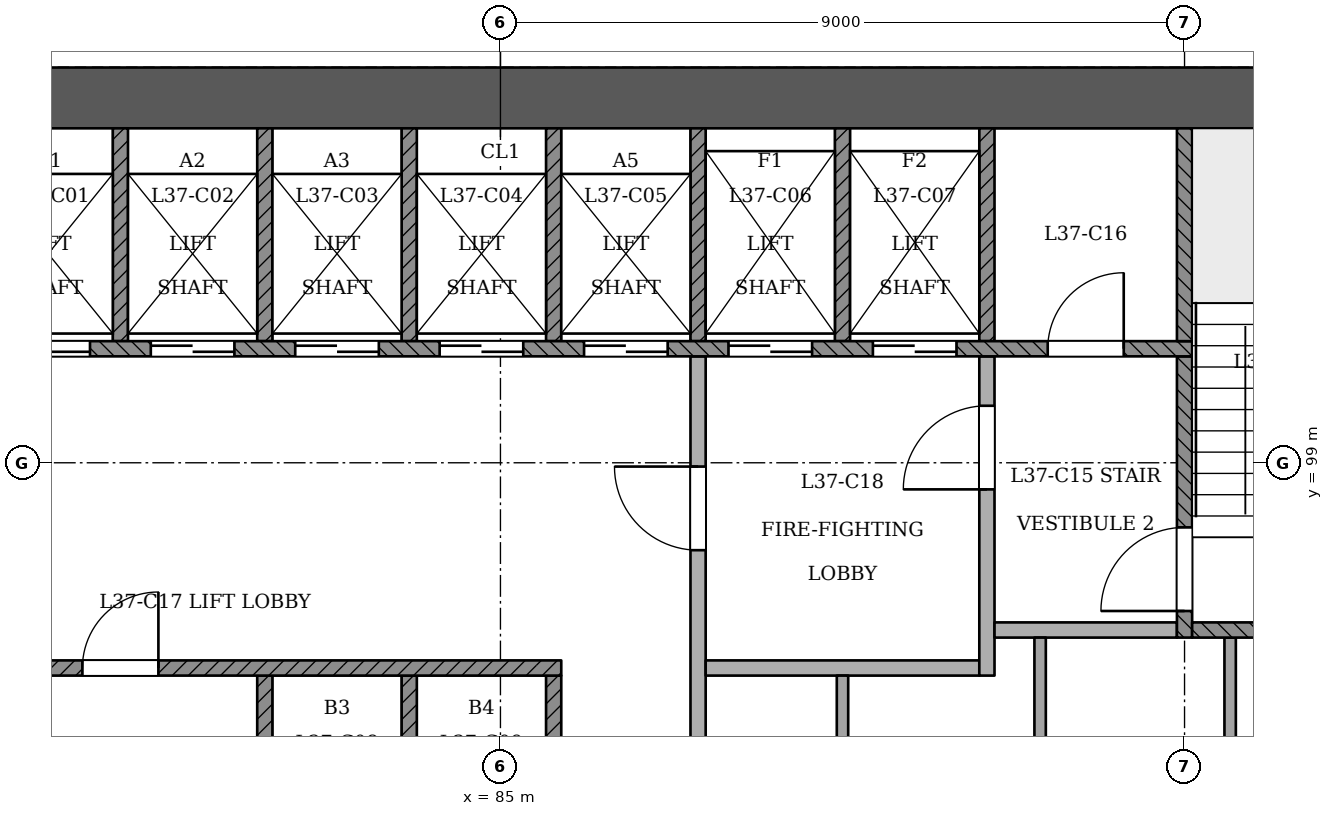
"""IFC4 building model, lengths in metres.
Left out: names, types, materials, properties, quantities, classifications, styles, units other than length and angle.
Written with IfcOpenShell. Run it as: python <this file> out.ifc"""

import sys

from ifc_helpers import new_model, si_unit, direction, frame, frame_2d, origin, place, context, subcontext, project, spatial, rectangle, extrude, element, fill, save


model = new_model("IFC4")
c1 = context("Model", 3, precision=1e-05, world=origin(), true_north=direction((0.0, 1.0)))
c2 = subcontext(c1, "Body", "Model", "MODEL_VIEW")
j1 = project(units=[si_unit("LENGTHUNIT", "METRE"), si_unit("PLANEANGLEUNIT", "RADIAN")], contexts=[c1])
p1 = place(None, origin())
s1 = spatial("IfcSite", under=j1, at=p1, CompositionType="ELEMENT")
p2 = place(p1, origin())
s2 = spatial("IfcBuilding", under=s1, at=p2, CompositionType="ELEMENT")
p3 = place(p2, frame((0.0, 0.0, 145.8)))
s3 = spatial("IfcBuildingStorey", under=s2, at=p3, CompositionType="ELEMENT", Elevation=145.8)
p4 = place(p3, frame((97.4, 103.8, 0.0), z_axis=(0.0, 0.0, 1.0), x_axis=(-1.0, 0.0, 0.0)))
e1 = element("IfcWall", 1, at=p4, inside=s3, PredefinedType="SHEAR", context=c2, shape_type="SweptSolid", body=[
    extrude(rectangle(XDim=25.2, YDim=0.8, at=frame_2d((12.6, 0.0))), origin(), (0.0, 0.0, 1.0), 3.6),
])
p5 = place(p3, frame((66.082, 96.91, 0.0), z_axis=(0.0, 0.0, 1.0), x_axis=(0.500001949747, -0.866024278094, 0.0)))
e2 = element("IfcWall", 2, at=p5, inside=s3, PredefinedType="PARTITIONING", context=c2, shape_type="SweptSolid", body=[
    extrude(rectangle(XDim=37.705, YDim=0.15, at=frame_2d((18.853, 0.0))), origin(), (0.0, 0.0, 1.0), 2.75),
])
p6 = place(p5, frame((1.75, 0.0, 0.0)))
e3 = element("IfcOpeningElement", 3, at=p6, cuts=e2, PredefinedType="OPENING", context=c2, shape_type="SweptSolid", body=[
    extrude(rectangle(XDim=1.0, YDim=2.1, at=frame_2d((0.5, 1.05))), frame((0.0, 0.085, 0.0), z_axis=(0.0, -1.0, 0.0), x_axis=(1.0, 0.0, 0.0)), (0.0, 0.0, 1.0), 0.171),
])
p7 = place(p5, frame((7.329, 0.0, 0.0)))
e4 = element("IfcOpeningElement", 4, at=p7, cuts=e2, PredefinedType="OPENING", context=c2, shape_type="SweptSolid", body=[
    extrude(rectangle(XDim=1.1, YDim=2.1, at=frame_2d((0.55, 1.05))), frame((0.0, 0.085, 0.0), z_axis=(0.0, -1.0, 0.0), x_axis=(1.0, 0.0, 0.0)), (0.0, 0.0, 1.0), 0.171),
])
p8 = place(p5, frame((9.72, 0.0, 0.0)))
e5 = element("IfcOpeningElement", 5, at=p8, cuts=e2, PredefinedType="OPENING", context=c2, shape_type="SweptSolid", body=[
    extrude(rectangle(XDim=1.0, YDim=2.1, at=frame_2d((0.5, 1.05))), frame((0.0, 0.085, 0.0), z_axis=(0.0, -1.0, 0.0), x_axis=(1.0, 0.0, 0.0)), (0.0, 0.0, 1.0), 0.171),
])
p9 = place(p5, frame((16.28, 0.0, 0.0)))
e6 = element("IfcOpeningElement", 6, at=p9, cuts=e2, PredefinedType="OPENING", context=c2, shape_type="SweptSolid", body=[
    extrude(rectangle(XDim=1.0, YDim=2.1, at=frame_2d((0.5, 1.05))), frame((0.0, 0.085, 0.0), z_axis=(0.0, -1.0, 0.0), x_axis=(1.0, 0.0, 0.0)), (0.0, 0.0, 1.0), 0.171),
])
p10 = place(p5, frame((18.72, 0.0, 0.0)))
e7 = element("IfcOpeningElement", 7, at=p10, cuts=e2, PredefinedType="OPENING", context=c2, shape_type="SweptSolid", body=[
    extrude(rectangle(XDim=1.0, YDim=2.1, at=frame_2d((0.5, 1.05))), frame((0.0, 0.085, 0.0), z_axis=(0.0, -1.0, 0.0), x_axis=(1.0, 0.0, 0.0)), (0.0, 0.0, 1.0), 0.171),
])
p11 = place(p5, frame((25.28, 0.0, 0.0)))
e8 = element("IfcOpeningElement", 8, at=p11, cuts=e2, PredefinedType="OPENING", context=c2, shape_type="SweptSolid", body=[
    extrude(rectangle(XDim=1.0, YDim=2.1, at=frame_2d((0.5, 1.05))), frame((0.0, 0.085, 0.0), z_axis=(0.0, -1.0, 0.0), x_axis=(1.0, 0.0, 0.0)), (0.0, 0.0, 1.0), 0.171),
])
p12 = place(p5, frame((27.72, 0.0, 0.0)))
e9 = element("IfcOpeningElement", 9, at=p12, cuts=e2, PredefinedType="OPENING", context=c2, shape_type="SweptSolid", body=[
    extrude(rectangle(XDim=1.0, YDim=2.1, at=frame_2d((0.5, 1.05))), frame((0.0, 0.085, 0.0), z_axis=(0.0, -1.0, 0.0), x_axis=(1.0, 0.0, 0.0)), (0.0, 0.0, 1.0), 0.171),
])
p13 = place(p5, frame((34.329, 0.0, 0.0)))
e10 = element("IfcOpeningElement", 10, at=p13, cuts=e2, PredefinedType="OPENING", context=c2, shape_type="SweptSolid", body=[
    extrude(rectangle(XDim=1.1, YDim=2.1, at=frame_2d((0.55, 1.05))), frame((0.0, 0.085, 0.0), z_axis=(0.0, -1.0, 0.0), x_axis=(1.0, 0.0, 0.0)), (0.0, 0.0, 1.0), 0.171),
])
p14 = place(p3, frame((85.0, 64.144, 0.0), z_axis=(0.0, 0.0, 1.0), x_axis=(0.50000053273, 0.866025096212, 0.0)))
e11 = element("IfcWall", 11, at=p14, inside=s3, PredefinedType="PARTITIONING", context=c2, shape_type="SweptSolid", body=[
    extrude(rectangle(XDim=39.671, YDim=0.15, at=frame_2d((19.835, 0.0))), origin(), (0.0, 0.0, 1.0), 2.75),
])
p15 = place(p14, frame((0.618, 0.0, 0.0)))
e12 = element("IfcOpeningElement", 12, at=p15, cuts=e11, PredefinedType="OPENING", context=c2, shape_type="SweptSolid", body=[
    extrude(rectangle(XDim=1.2, YDim=2.1, at=frame_2d((0.6, 1.05))), frame((0.0, 0.085, 0.0), z_axis=(0.0, -1.0, 0.0), x_axis=(1.0, 0.0, 0.0)), (0.0, 0.0, 1.0), 0.171),
])
p16 = place(p14, frame((9.115, 0.0, 0.0)))
e13 = element("IfcOpeningElement", 13, at=p16, cuts=e11, PredefinedType="OPENING", context=c2, shape_type="SweptSolid", body=[
    extrude(rectangle(XDim=1.0, YDim=2.1, at=frame_2d((0.5, 1.05))), frame((0.0, 0.085, 0.0), z_axis=(0.0, -1.0, 0.0), x_axis=(1.0, 0.0, 0.0)), (0.0, 0.0, 1.0), 0.171),
])
p17 = place(p14, frame((11.556, 0.0, 0.0)))
e14 = element("IfcOpeningElement", 14, at=p17, cuts=e11, PredefinedType="OPENING", context=c2, shape_type="SweptSolid", body=[
    extrude(rectangle(XDim=1.0, YDim=2.1, at=frame_2d((0.5, 1.05))), frame((0.0, 0.085, 0.0), z_axis=(0.0, -1.0, 0.0), x_axis=(1.0, 0.0, 0.0)), (0.0, 0.0, 1.0), 0.171),
])
p18 = place(p14, frame((18.115, 0.0, 0.0)))
e15 = element("IfcOpeningElement", 15, at=p18, cuts=e11, PredefinedType="OPENING", context=c2, shape_type="SweptSolid", body=[
    extrude(rectangle(XDim=1.0, YDim=2.1, at=frame_2d((0.5, 1.05))), frame((0.0, 0.085, 0.0), z_axis=(0.0, -1.0, 0.0), x_axis=(1.0, 0.0, 0.0)), (0.0, 0.0, 1.0), 0.171),
])
p19 = place(p14, frame((20.556, 0.0, 0.0)))
e16 = element("IfcOpeningElement", 16, at=p19, cuts=e11, PredefinedType="OPENING", context=c2, shape_type="SweptSolid", body=[
    extrude(rectangle(XDim=1.0, YDim=2.1, at=frame_2d((0.5, 1.05))), frame((0.0, 0.085, 0.0), z_axis=(0.0, -1.0, 0.0), x_axis=(1.0, 0.0, 0.0)), (0.0, 0.0, 1.0), 0.171),
])
p20 = place(p14, frame((27.115, 0.0, 0.0)))
e17 = element("IfcOpeningElement", 17, at=p20, cuts=e11, PredefinedType="OPENING", context=c2, shape_type="SweptSolid", body=[
    extrude(rectangle(XDim=1.0, YDim=2.1, at=frame_2d((0.5, 1.05))), frame((0.0, 0.085, 0.0), z_axis=(0.0, -1.0, 0.0), x_axis=(1.0, 0.0, 0.0)), (0.0, 0.0, 1.0), 0.171),
])
p21 = place(p14, frame((30.585, 0.0, 0.0)))
e18 = element("IfcOpeningElement", 18, at=p21, cuts=e11, PredefinedType="OPENING", context=c2, shape_type="SweptSolid", body=[
    extrude(rectangle(XDim=1.0, YDim=2.1, at=frame_2d((0.5, 1.05))), frame((0.0, 0.085, 0.0), z_axis=(0.0, -1.0, 0.0), x_axis=(1.0, 0.0, 0.0)), (0.0, 0.0, 1.0), 0.171),
])
p22 = place(p14, frame((36.164, 0.0, 0.0)))
e19 = element("IfcOpeningElement", 19, at=p22, cuts=e11, PredefinedType="OPENING", context=c2, shape_type="SweptSolid", body=[
    extrude(rectangle(XDim=1.1, YDim=2.1, at=frame_2d((0.55, 1.05))), frame((0.0, 0.085, 0.0), z_axis=(0.0, -1.0, 0.0), x_axis=(1.0, 0.0, 0.0)), (0.0, 0.0, 1.0), 0.171),
])
p23 = place(p14, frame((38.271, 0.0, 0.0)))
e20 = element("IfcOpeningElement", 20, at=p23, cuts=e11, PredefinedType="OPENING", context=c2, shape_type="SweptSolid", body=[
    extrude(rectangle(XDim=1.2, YDim=2.1, at=frame_2d((0.6, 1.05))), frame((0.0, 0.085, 0.0), z_axis=(0.0, -1.0, 0.0), x_axis=(1.0, 0.0, 0.0)), (0.0, 0.0, 1.0), 0.171),
])
for number, where, z_axis, x_axis in (
    (21, (81.9, 93.4, 0.0), (0.0, 0.0, 1.0), (0.0, 1.0, 0.0)),
    (22, (83.8, 93.4, 0.0), (0.0, 0.0, 1.0), (0.0, 1.0, 0.0)),
    (23, (85.7, 93.4, 0.0), (0.0, 0.0, 1.0), (0.0, 1.0, 0.0)),
):
    element("IfcWall", number, at=place(p3, frame(where, z_axis=z_axis, x_axis=x_axis)), inside=s3, PredefinedType="SOLIDWALL", context=c2, shape_type="SweptSolid", body=[
        extrude(rectangle(XDim=2.8, YDim=0.2, at=frame_2d((1.4, 0.0))), origin(), (0.0, 0.0, 1.0), 3.15),
    ])
p24 = place(p3, frame((87.6, 93.4, 0.0), z_axis=(0.0, 0.0, 1.0), x_axis=(0.0, 1.0, 0.0)))
e24 = element("IfcWall", 24, at=p24, inside=s3, PredefinedType="PARTITIONING", context=c2, shape_type="SweptSolid", body=[
    extrude(rectangle(XDim=7.0, YDim=0.2, at=frame_2d((3.5, 0.0))), origin(), (0.0, 0.0, 1.0), 3.15),
])
p25 = place(p24, frame((4.45, 0.0, 0.0)))
e25 = element("IfcOpeningElement", 25, at=p25, cuts=e24, PredefinedType="OPENING", context=c2, shape_type="SweptSolid", body=[
    extrude(rectangle(XDim=1.1, YDim=2.1, at=frame_2d((0.55, 1.05))), frame((0.0, 0.11, 0.0), z_axis=(0.0, -1.0, 0.0), x_axis=(1.0, 0.0, 0.0)), (0.0, 0.0, 1.0), 0.221),
])
p26 = place(p3, frame((89.5, 93.4, 0.0), z_axis=(0.0, 0.0, 1.0), x_axis=(0.0, 1.0, 0.0)))
e26 = element("IfcWall", 26, at=p26, inside=s3, PredefinedType="PARTITIONING", context=c2, shape_type="SweptSolid", body=[
    extrude(rectangle(XDim=2.8, YDim=0.15, at=frame_2d((1.4, 0.0))), origin(), (0.0, 0.0, 1.0), 3.15),
])
for number, where, z_axis, x_axis in (
    (27, (92.1, 93.4, 0.0), (0.0, 0.0, 1.0), (0.0, 1.0, 0.0)),
    (28, (94.6, 93.4, 0.0), (0.0, 0.0, 1.0), (0.0, 1.0, 0.0)),
):
    element("IfcWall", number, at=place(p3, frame(where, z_axis=z_axis, x_axis=x_axis)), inside=s3, PredefinedType="PARTITIONING", context=c2, shape_type="SweptSolid", body=[
        extrude(rectangle(XDim=3.3, YDim=0.15, at=frame_2d((1.65, 0.0))), origin(), (0.0, 0.0, 1.0), 3.15),
    ])
p27 = place(p3, frame((78.0, 96.3, 0.0), z_axis=(0.0, 0.0, 1.0), x_axis=(1.0, 0.0, 0.0)))
e29 = element("IfcWall", 29, at=p27, inside=s3, PredefinedType="SOLIDWALL", context=c2, shape_type="SweptSolid", body=[
    extrude(rectangle(XDim=7.8, YDim=0.2, at=frame_2d((3.9, 0.0))), origin(), (0.0, 0.0, 1.0), 3.15),
])
p28 = place(p27, frame((1.5, 0.0, 0.0)))
e30 = element("IfcOpeningElement", 30, at=p28, cuts=e29, PredefinedType="OPENING", context=c2, shape_type="SweptSolid", body=[
    extrude(rectangle(XDim=1.0, YDim=2.1, at=frame_2d((0.5, 1.05))), frame((0.0, 0.11, 0.0), z_axis=(0.0, -1.0, 0.0), x_axis=(1.0, 0.0, 0.0)), (0.0, 0.0, 1.0), 0.221),
])
p29 = place(p3, frame((87.7, 96.3, 0.0), z_axis=(0.0, 0.0, 1.0), x_axis=(1.0, 0.0, 0.0)))
e31 = element("IfcWall", 31, at=p29, inside=s3, PredefinedType="PARTITIONING", context=c2, shape_type="SweptSolid", body=[
    extrude(rectangle(XDim=3.6, YDim=0.2, at=frame_2d((1.8, 0.0))), origin(), (0.0, 0.0, 1.0), 3.15),
])
p30 = place(p3, frame((91.4, 96.2, 0.0), z_axis=(0.0, 0.0, 1.0), x_axis=(0.0, 1.0, 0.0)))
e32 = element("IfcWall", 32, at=p30, inside=s3, PredefinedType="PARTITIONING", context=c2, shape_type="SweptSolid", body=[
    extrude(rectangle(XDim=4.2, YDim=0.2, at=frame_2d((2.1, 0.0))), origin(), (0.0, 0.0, 1.0), 3.15),
])
p31 = place(p30, frame((2.45, 0.0, 0.0)))
e33 = element("IfcOpeningElement", 33, at=p31, cuts=e32, PredefinedType="OPENING", context=c2, shape_type="SweptSolid", body=[
    extrude(rectangle(XDim=1.1, YDim=2.1, at=frame_2d((0.55, 1.05))), frame((0.0, 0.11, 0.0), z_axis=(0.0, -1.0, 0.0), x_axis=(1.0, 0.0, 0.0)), (0.0, 0.0, 1.0), 0.221),
])
p32 = place(p3, frame((91.5, 96.8, 0.0), z_axis=(0.0, 0.0, 1.0), x_axis=(1.0, 0.0, 0.0)))
e34 = element("IfcWall", 34, at=p32, inside=s3, PredefinedType="PARTITIONING", context=c2, shape_type="SweptSolid", body=[
    extrude(rectangle(XDim=2.4, YDim=0.2, at=frame_2d((1.2, 0.0))), origin(), (0.0, 0.0, 1.0), 3.15),
])
p33 = place(p3, frame((94.0, 96.7, 0.0), z_axis=(0.0, 0.0, 1.0), x_axis=(0.0, 1.0, 0.0)))
e35 = element("IfcWall", 35, at=p33, inside=s3, PredefinedType="SOLIDWALL", context=c2, shape_type="SweptSolid", body=[
    extrude(rectangle(XDim=3.7, YDim=0.2, at=frame_2d((1.85, 0.0))), origin(), (0.0, 0.0, 1.0), 3.15),
])
p34 = place(p33, frame((0.35, 0.0, 0.0)))
e36 = element("IfcOpeningElement", 36, at=p34, cuts=e35, PredefinedType="OPENING", context=c2, shape_type="SweptSolid", body=[
    extrude(rectangle(XDim=1.1, YDim=2.1, at=frame_2d((0.55, 1.05))), frame((0.0, 0.11, 0.0), z_axis=(0.0, -1.0, 0.0), x_axis=(1.0, 0.0, 0.0)), (0.0, 0.0, 1.0), 0.221),
])
p35 = place(p3, frame((94.1, 96.8, 0.0), z_axis=(0.0, 0.0, 1.0), x_axis=(1.0, 0.0, 0.0)))
e37 = element("IfcWall", 37, at=p35, inside=s3, PredefinedType="SOLIDWALL", context=c2, shape_type="SweptSolid", body=[
    extrude(rectangle(XDim=2.9, YDim=0.2, at=frame_2d((1.45, 0.0))), origin(), (0.0, 0.0, 1.0), 3.15),
])
p36 = place(p3, frame((75.9, 100.5, 0.0), z_axis=(0.0, 0.0, 1.0), x_axis=(1.0, 0.0, 0.0)))
e38 = element("IfcWall", 38, at=p36, inside=s3, PredefinedType="SOLIDWALL", context=c2, shape_type="SweptSolid", body=[
    extrude(rectangle(XDim=18.2, YDim=0.2, at=frame_2d((9.1, 0.0))), origin(), (0.0, 0.0, 1.0), 3.15),
])
p37 = place(p36, frame((2.6, 0.0, 0.0)))
e39 = element("IfcOpeningElement", 39, at=p37, cuts=e38, PredefinedType="OPENING", context=c2, shape_type="SweptSolid", body=[
    extrude(rectangle(XDim=1.1, YDim=2.1, at=frame_2d((0.55, 1.05))), frame((0.0, 0.11, 0.0), z_axis=(0.0, -1.0, 0.0), x_axis=(1.0, 0.0, 0.0)), (0.0, 0.0, 1.0), 0.221),
])
p38 = place(p36, frame((4.5, 0.0, 0.0)))
e40 = element("IfcOpeningElement", 40, at=p38, cuts=e38, PredefinedType="OPENING", context=c2, shape_type="SweptSolid", body=[
    extrude(rectangle(XDim=1.1, YDim=2.1, at=frame_2d((0.55, 1.05))), frame((0.0, 0.11, 0.0), z_axis=(0.0, -1.0, 0.0), x_axis=(1.0, 0.0, 0.0)), (0.0, 0.0, 1.0), 0.221),
])
p39 = place(p36, frame((6.4, 0.0, 0.0)))
e41 = element("IfcOpeningElement", 41, at=p39, cuts=e38, PredefinedType="OPENING", context=c2, shape_type="SweptSolid", body=[
    extrude(rectangle(XDim=1.1, YDim=2.1, at=frame_2d((0.55, 1.05))), frame((0.0, 0.11, 0.0), z_axis=(0.0, -1.0, 0.0), x_axis=(1.0, 0.0, 0.0)), (0.0, 0.0, 1.0), 0.221),
])
p40 = place(p36, frame((8.3, 0.0, 0.0)))
e42 = element("IfcOpeningElement", 42, at=p40, cuts=e38, PredefinedType="OPENING", context=c2, shape_type="SweptSolid", body=[
    extrude(rectangle(XDim=1.1, YDim=2.1, at=frame_2d((0.55, 1.05))), frame((0.0, 0.11, 0.0), z_axis=(0.0, -1.0, 0.0), x_axis=(1.0, 0.0, 0.0)), (0.0, 0.0, 1.0), 0.221),
])
p41 = place(p36, frame((10.2, 0.0, 0.0)))
e43 = element("IfcOpeningElement", 43, at=p41, cuts=e38, PredefinedType="OPENING", context=c2, shape_type="SweptSolid", body=[
    extrude(rectangle(XDim=1.1, YDim=2.1, at=frame_2d((0.55, 1.05))), frame((0.0, 0.11, 0.0), z_axis=(0.0, -1.0, 0.0), x_axis=(1.0, 0.0, 0.0)), (0.0, 0.0, 1.0), 0.221),
])
p42 = place(p36, frame((12.1, 0.0, 0.0)))
e44 = element("IfcOpeningElement", 44, at=p42, cuts=e38, PredefinedType="OPENING", context=c2, shape_type="SweptSolid", body=[
    extrude(rectangle(XDim=1.1, YDim=2.1, at=frame_2d((0.55, 1.05))), frame((0.0, 0.11, 0.0), z_axis=(0.0, -1.0, 0.0), x_axis=(1.0, 0.0, 0.0)), (0.0, 0.0, 1.0), 0.221),
])
p43 = place(p36, frame((14.0, 0.0, 0.0)))
e45 = element("IfcOpeningElement", 45, at=p43, cuts=e38, PredefinedType="OPENING", context=c2, shape_type="SweptSolid", body=[
    extrude(rectangle(XDim=1.1, YDim=2.1, at=frame_2d((0.55, 1.05))), frame((0.0, 0.11, 0.0), z_axis=(0.0, -1.0, 0.0), x_axis=(1.0, 0.0, 0.0)), (0.0, 0.0, 1.0), 0.221),
])
p44 = place(p36, frame((0.65, 0.0, 0.0)))
e46 = element("IfcOpeningElement", 46, at=p44, cuts=e38, PredefinedType="OPENING", context=c2, shape_type="SweptSolid", body=[
    extrude(rectangle(XDim=1.0, YDim=2.1, at=frame_2d((0.5, 1.05))), frame((0.0, 0.11, 0.0), z_axis=(0.0, -1.0, 0.0), x_axis=(1.0, 0.0, 0.0)), (0.0, 0.0, 1.0), 0.221),
])
p45 = place(p36, frame((16.3, 0.0, 0.0)))
e47 = element("IfcOpeningElement", 47, at=p45, cuts=e38, PredefinedType="OPENING", context=c2, shape_type="SweptSolid", body=[
    extrude(rectangle(XDim=1.0, YDim=2.1, at=frame_2d((0.5, 1.05))), frame((0.0, 0.11, 0.0), z_axis=(0.0, -1.0, 0.0), x_axis=(1.0, 0.0, 0.0)), (0.0, 0.0, 1.0), 0.221),
])
for number, where, z_axis, x_axis in (
    (48, (80.0, 100.6, 0.0), (0.0, 0.0, 1.0), (0.0, 1.0, 0.0)),
    (49, (81.9, 100.6, 0.0), (0.0, 0.0, 1.0), (0.0, 1.0, 0.0)),
    (50, (83.8, 100.6, 0.0), (0.0, 0.0, 1.0), (0.0, 1.0, 0.0)),
    (51, (85.7, 100.6, 0.0), (0.0, 0.0, 1.0), (0.0, 1.0, 0.0)),
    (52, (87.6, 100.6, 0.0), (0.0, 0.0, 1.0), (0.0, 1.0, 0.0)),
    (53, (89.5, 100.6, 0.0), (0.0, 0.0, 1.0), (0.0, 1.0, 0.0)),
    (54, (91.4, 100.6, 0.0), (0.0, 0.0, 1.0), (0.0, 1.0, 0.0)),
    (55, (94.0, 100.6, 0.0), (0.0, 0.0, 1.0), (0.0, 1.0, 0.0)),
):
    element("IfcWall", number, at=place(p3, frame(where, z_axis=z_axis, x_axis=x_axis)), inside=s3, PredefinedType="SOLIDWALL", context=c2, shape_type="SweptSolid", body=[
        extrude(rectangle(XDim=2.8, YDim=0.2, at=frame_2d((1.4, 0.0))), origin(), (0.0, 0.0, 1.0), 3.15),
    ])
p46 = place(p37, origin())
e56 = element("IfcDoor", 56, at=p46, inside=s3, OperationType="SLIDING_TO_RIGHT", PredefinedType="NOTDEFINED", context=c2, shape_type="SweptSolid", body=[
    extrude(rectangle(XDim=1.1, YDim=2.1, at=frame_2d((0.55, 1.05))), frame((0.0, 0.025, 0.0), z_axis=(0.0, -1.0, 0.0), x_axis=(1.0, 0.0, 0.0)), (0.0, 0.0, 1.0), 0.05),
])
fill(e39, e56)
p47 = place(p38, origin())
e57 = element("IfcDoor", 57, at=p47, inside=s3, OperationType="SLIDING_TO_LEFT", PredefinedType="NOTDEFINED", context=c2, shape_type="SweptSolid", body=[
    extrude(rectangle(XDim=1.1, YDim=2.1, at=frame_2d((0.55, 1.05))), frame((0.0, 0.025, 0.0), z_axis=(0.0, -1.0, 0.0), x_axis=(1.0, 0.0, 0.0)), (0.0, 0.0, 1.0), 0.05),
])
fill(e40, e57)
p48 = place(p39, origin())
e58 = element("IfcDoor", 58, at=p48, inside=s3, OperationType="SLIDING_TO_RIGHT", PredefinedType="NOTDEFINED", context=c2, shape_type="SweptSolid", body=[
    extrude(rectangle(XDim=1.1, YDim=2.1, at=frame_2d((0.55, 1.05))), frame((0.0, 0.025, 0.0), z_axis=(0.0, -1.0, 0.0), x_axis=(1.0, 0.0, 0.0)), (0.0, 0.0, 1.0), 0.05),
])
fill(e41, e58)
p49 = place(p40, origin())
e59 = element("IfcDoor", 59, at=p49, inside=s3, OperationType="SLIDING_TO_LEFT", PredefinedType="NOTDEFINED", context=c2, shape_type="SweptSolid", body=[
    extrude(rectangle(XDim=1.1, YDim=2.1, at=frame_2d((0.55, 1.05))), frame((0.0, 0.025, 0.0), z_axis=(0.0, -1.0, 0.0), x_axis=(1.0, 0.0, 0.0)), (0.0, 0.0, 1.0), 0.05),
])
fill(e42, e59)
p50 = place(p41, origin())
e60 = element("IfcDoor", 60, at=p50, inside=s3, OperationType="SLIDING_TO_RIGHT", PredefinedType="NOTDEFINED", context=c2, shape_type="SweptSolid", body=[
    extrude(rectangle(XDim=1.1, YDim=2.1, at=frame_2d((0.55, 1.05))), frame((0.0, 0.025, 0.0), z_axis=(0.0, -1.0, 0.0), x_axis=(1.0, 0.0, 0.0)), (0.0, 0.0, 1.0), 0.05),
])
fill(e43, e60)
p51 = place(p42, origin())
e61 = element("IfcDoor", 61, at=p51, inside=s3, OperationType="SLIDING_TO_RIGHT", PredefinedType="NOTDEFINED", context=c2, shape_type="SweptSolid", body=[
    extrude(rectangle(XDim=1.1, YDim=2.1, at=frame_2d((0.55, 1.05))), frame((0.0, 0.025, 0.0), z_axis=(0.0, -1.0, 0.0), x_axis=(1.0, 0.0, 0.0)), (0.0, 0.0, 1.0), 0.05),
])
fill(e44, e61)
p52 = place(p43, origin())
e62 = element("IfcDoor", 62, at=p52, inside=s3, OperationType="SLIDING_TO_LEFT", PredefinedType="NOTDEFINED", context=c2, shape_type="SweptSolid", body=[
    extrude(rectangle(XDim=1.1, YDim=2.1, at=frame_2d((0.55, 1.05))), frame((0.0, 0.025, 0.0), z_axis=(0.0, -1.0, 0.0), x_axis=(1.0, 0.0, 0.0)), (0.0, 0.0, 1.0), 0.05),
])
fill(e45, e62)
p53 = place(p34, origin())
e63 = element("IfcDoor", 63, at=p53, inside=s3, OperationType="SINGLE_SWING_LEFT", PredefinedType="NOTDEFINED", context=c2, shape_type="SweptSolid", body=[
    extrude(rectangle(XDim=1.1, YDim=2.1, at=frame_2d((0.55, 1.05))), frame((0.0, 0.025, 0.0), z_axis=(0.0, -1.0, 0.0), x_axis=(1.0, 0.0, 0.0)), (0.0, 0.0, 1.0), 0.05),
])
fill(e36, e63)
p54 = place(p25, origin())
e64 = element("IfcDoor", 64, at=p54, inside=s3, OperationType="SINGLE_SWING_RIGHT", PredefinedType="NOTDEFINED", context=c2, shape_type="SweptSolid", body=[
    extrude(rectangle(XDim=1.1, YDim=2.1, at=frame_2d((0.55, 1.05))), frame((0.0, 0.025, 0.0), z_axis=(0.0, -1.0, 0.0), x_axis=(1.0, 0.0, 0.0)), (0.0, 0.0, 1.0), 0.05),
])
fill(e25, e64)
p55 = place(p31, origin())
e65 = element("IfcDoor", 65, at=p55, inside=s3, OperationType="SINGLE_SWING_LEFT", PredefinedType="NOTDEFINED", context=c2, shape_type="SweptSolid", body=[
    extrude(rectangle(XDim=1.1, YDim=2.1, at=frame_2d((0.55, 1.05))), frame((0.0, 0.025, 0.0), z_axis=(0.0, -1.0, 0.0), x_axis=(1.0, 0.0, 0.0)), (0.0, 0.0, 1.0), 0.05),
])
fill(e33, e65)
p56 = place(p45, origin())
e66 = element("IfcDoor", 66, at=p56, inside=s3, OperationType="SINGLE_SWING_RIGHT", PredefinedType="NOTDEFINED", context=c2, shape_type="SweptSolid", body=[
    extrude(rectangle(XDim=1.0, YDim=2.1, at=frame_2d((0.5, 1.05))), frame((0.0, 0.025, 0.0), z_axis=(0.0, -1.0, 0.0), x_axis=(1.0, 0.0, 0.0)), (0.0, 0.0, 1.0), 0.05),
])
fill(e47, e66)
p57 = place(p28, origin())
e67 = element("IfcDoor", 67, at=p57, inside=s3, OperationType="SINGLE_SWING_RIGHT", PredefinedType="NOTDEFINED", context=c2, shape_type="SweptSolid", body=[
    extrude(rectangle(XDim=1.0, YDim=2.1, at=frame_2d((0.5, 1.05))), frame((0.0, 0.025, 0.0), z_axis=(0.0, -1.0, 0.0), x_axis=(1.0, 0.0, 0.0)), (0.0, 0.0, 1.0), 0.05),
])
fill(e30, e67)
save(model, sys.argv[1])
